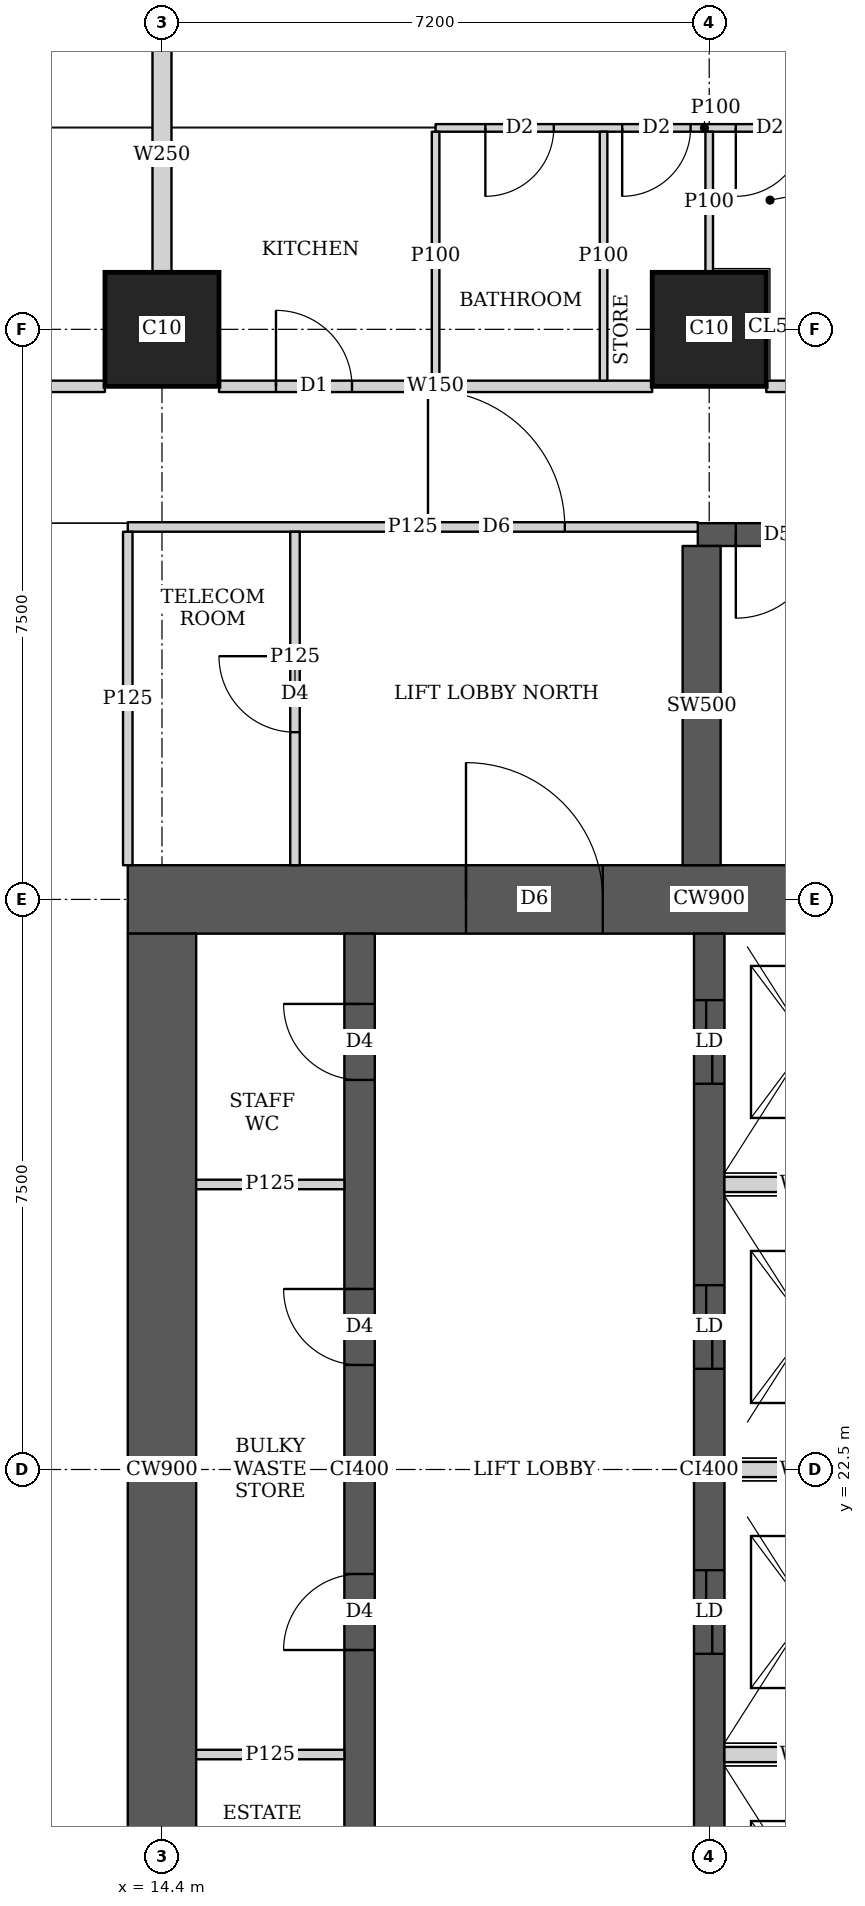
"""IFC4 building model, lengths in metres.
Left out: names, types, materials, properties, quantities, classifications, styles, units other than length and angle.
Written with IfcOpenShell. Run it as: python <this file> out.ifc"""

import sys

from ifc_helpers import new_model, si_unit, direction, frame, frame_2d, origin, origin_2d, place, context, subcontext, project, spatial, rectangle, extrude, element, fill, save


model = new_model("IFC4")
c1 = context("Model", 3, precision=1e-05, world=origin(), true_north=direction((0.0, 1.0)))
c2 = subcontext(c1, "Body", "Model", "MODEL_VIEW")
j1 = project(units=[si_unit("LENGTHUNIT", "METRE"), si_unit("PLANEANGLEUNIT", "RADIAN")], contexts=[c1])
p1 = place(None, origin())
s1 = spatial("IfcSite", under=j1, at=p1, CompositionType="ELEMENT")
p2 = place(p1, origin())
s2 = spatial("IfcBuilding", under=s1, at=p2, CompositionType="ELEMENT")
p3 = place(p2, frame((0.0, 0.0, 147.05)))
s3 = spatial("IfcBuildingStorey", under=s2, at=p3, CompositionType="ELEMENT", Elevation=147.05)
for number, where, z_axis, x_axis in (
    (1, (14.4, 37.5, 0.0), (0.0, 0.0, 1.0), (1.0, 0.0, 0.0)),
    (2, (21.6, 37.5, 0.0), (0.0, 0.0, 1.0), (1.0, 0.0, 0.0)),
):
    element("IfcColumn", number, at=place(p3, frame(where, z_axis=z_axis, x_axis=x_axis)), inside=s3, PredefinedType="COLUMN", context=c2, shape_type="SweptSolid", body=[
        extrude(rectangle(XDim=1.5, YDim=1.5, at=origin_2d()), origin(), (0.0, 0.0, 1.0), 3.75),
    ])
p4 = place(p3, frame((13.95, 30.0, 0.0), z_axis=(0.0, 0.0, 1.0), x_axis=(1.0, 0.0, 0.0)))
e3 = element("IfcWall", 3, at=p4, inside=s3, PredefinedType="SHEAR", context=c2, shape_type="SweptSolid", body=[
    extrude(rectangle(XDim=15.3, YDim=0.9, at=frame_2d((7.65, 0.0))), origin(), (0.0, 0.0, 1.0), 3.75),
])
p5 = place(p4, frame((4.45, 0.0, 0.0)))
e4 = element("IfcOpeningElement", 4, at=p5, cuts=e3, PredefinedType="OPENING", context=c2, shape_type="SweptSolid", body=[
    extrude(rectangle(XDim=1.8, YDim=2.1, at=frame_2d((0.9, 1.05))), frame((0.0, 0.46, 0.0), z_axis=(0.0, -1.0, 0.0), x_axis=(1.0, 0.0, 0.0)), (0.0, 0.0, 1.0), 0.92),
])
p6 = place(p4, frame((10.7, 0.0, 0.0)))
e5 = element("IfcOpeningElement", 5, at=p6, cuts=e3, PredefinedType="OPENING", context=c2, shape_type="SweptSolid", body=[
    extrude(rectangle(XDim=1.1, YDim=2.1, at=frame_2d((0.55, 1.05))), frame((0.0, 0.46, 0.0), z_axis=(0.0, -1.0, 0.0), x_axis=(1.0, 0.0, 0.0)), (0.0, 0.0, 1.0), 0.92),
])
p7 = place(p3, frame((14.4, 15.45, 0.0), z_axis=(0.0, 0.0, 1.0), x_axis=(0.0, 1.0, 0.0)))
e6 = element("IfcWall", 6, at=p7, inside=s3, PredefinedType="SHEAR", context=c2, shape_type="SweptSolid", body=[
    extrude(rectangle(XDim=14.1, YDim=0.9, at=frame_2d((7.05, 0.0))), origin(), (0.0, 0.0, 1.0), 3.75),
])
p8 = place(p3, frame((17.0, 15.45, 0.0), z_axis=(0.0, 0.0, 1.0), x_axis=(0.0, 1.0, 0.0)))
e7 = element("IfcWall", 7, at=p8, inside=s3, PredefinedType="SHEAR", context=c2, shape_type="SweptSolid", body=[
    extrude(rectangle(XDim=14.1, YDim=0.4, at=frame_2d((7.05, 0.0))), origin(), (0.0, 0.0, 1.0), 3.75),
])
p9 = place(p8, frame((0.925, 0.0, 0.0)))
e8 = element("IfcOpeningElement", 8, at=p9, cuts=e7, PredefinedType="OPENING", context=c2, shape_type="SweptSolid", body=[
    extrude(rectangle(XDim=1.0, YDim=2.1, at=frame_2d((0.5, 1.05))), frame((0.0, 0.21, 0.0), z_axis=(0.0, -1.0, 0.0), x_axis=(1.0, 0.0, 0.0)), (0.0, 0.0, 1.0), 0.42),
])
p10 = place(p8, frame((4.675, 0.0, 0.0)))
e9 = element("IfcOpeningElement", 9, at=p10, cuts=e7, PredefinedType="OPENING", context=c2, shape_type="SweptSolid", body=[
    extrude(rectangle(XDim=1.0, YDim=2.1, at=frame_2d((0.5, 1.05))), frame((0.0, 0.21, 0.0), z_axis=(0.0, -1.0, 0.0), x_axis=(1.0, 0.0, 0.0)), (0.0, 0.0, 1.0), 0.42),
])
p11 = place(p8, frame((8.425, 0.0, 0.0)))
e10 = element("IfcOpeningElement", 10, at=p11, cuts=e7, PredefinedType="OPENING", context=c2, shape_type="SweptSolid", body=[
    extrude(rectangle(XDim=1.0, YDim=2.1, at=frame_2d((0.5, 1.05))), frame((0.0, 0.21, 0.0), z_axis=(0.0, -1.0, 0.0), x_axis=(1.0, 0.0, 0.0)), (0.0, 0.0, 1.0), 0.42),
])
p12 = place(p8, frame((12.175, 0.0, 0.0)))
e11 = element("IfcOpeningElement", 11, at=p12, cuts=e7, PredefinedType="OPENING", context=c2, shape_type="SweptSolid", body=[
    extrude(rectangle(XDim=1.0, YDim=2.1, at=frame_2d((0.5, 1.05))), frame((0.0, 0.21, 0.0), z_axis=(0.0, -1.0, 0.0), x_axis=(1.0, 0.0, 0.0)), (0.0, 0.0, 1.0), 0.42),
])
p13 = place(p3, frame((21.6, 15.45, 0.0), z_axis=(0.0, 0.0, 1.0), x_axis=(0.0, 1.0, 0.0)))
e12 = element("IfcWall", 12, at=p13, inside=s3, PredefinedType="SHEAR", context=c2, shape_type="SweptSolid", body=[
    extrude(rectangle(XDim=14.1, YDim=0.4, at=frame_2d((7.05, 0.0))), origin(), (0.0, 0.0, 1.0), 3.75),
])
p14 = place(p13, frame((0.875, 0.0, 0.0)))
e13 = element("IfcOpeningElement", 13, at=p14, cuts=e12, PredefinedType="OPENING", context=c2, shape_type="SweptSolid", body=[
    extrude(rectangle(XDim=1.1, YDim=2.1, at=frame_2d((0.55, 1.05))), frame((0.0, 0.21, 0.0), z_axis=(0.0, -1.0, 0.0), x_axis=(1.0, 0.0, 0.0)), (0.0, 0.0, 1.0), 0.42),
])
p15 = place(p13, frame((4.625, 0.0, 0.0)))
e14 = element("IfcOpeningElement", 14, at=p15, cuts=e12, PredefinedType="OPENING", context=c2, shape_type="SweptSolid", body=[
    extrude(rectangle(XDim=1.1, YDim=2.1, at=frame_2d((0.55, 1.05))), frame((0.0, 0.21, 0.0), z_axis=(0.0, -1.0, 0.0), x_axis=(1.0, 0.0, 0.0)), (0.0, 0.0, 1.0), 0.42),
])
p16 = place(p13, frame((8.375, 0.0, 0.0)))
e15 = element("IfcOpeningElement", 15, at=p16, cuts=e12, PredefinedType="OPENING", context=c2, shape_type="SweptSolid", body=[
    extrude(rectangle(XDim=1.1, YDim=2.1, at=frame_2d((0.55, 1.05))), frame((0.0, 0.21, 0.0), z_axis=(0.0, -1.0, 0.0), x_axis=(1.0, 0.0, 0.0)), (0.0, 0.0, 1.0), 0.42),
])
p17 = place(p13, frame((12.125, 0.0, 0.0)))
e16 = element("IfcOpeningElement", 16, at=p17, cuts=e12, PredefinedType="OPENING", context=c2, shape_type="SweptSolid", body=[
    extrude(rectangle(XDim=1.1, YDim=2.1, at=frame_2d((0.55, 1.05))), frame((0.0, 0.21, 0.0), z_axis=(0.0, -1.0, 0.0), x_axis=(1.0, 0.0, 0.0)), (0.0, 0.0, 1.0), 0.42),
])
p18 = place(p3, frame((21.45, 34.8, 0.0), z_axis=(0.0, 0.0, 1.0), x_axis=(1.0, 0.0, 0.0)))
e17 = element("IfcWall", 17, at=p18, inside=s3, PredefinedType="SHEAR", context=c2, shape_type="SweptSolid", body=[
    extrude(rectangle(XDim=7.5, YDim=0.3, at=frame_2d((3.75, 0.0))), origin(), (0.0, 0.0, 1.0), 3.75),
])
p19 = place(p18, frame((0.5, 0.0, 0.0)))
e18 = element("IfcOpeningElement", 18, at=p19, cuts=e17, PredefinedType="OPENING", context=c2, shape_type="SweptSolid", body=[
    extrude(rectangle(XDim=1.1, YDim=2.1, at=frame_2d((0.55, 1.05))), frame((0.0, 0.16, 0.0), z_axis=(0.0, -1.0, 0.0), x_axis=(1.0, 0.0, 0.0)), (0.0, 0.0, 1.0), 0.32),
])
p20 = place(p3, frame((21.5, 30.45, 0.0), z_axis=(0.0, 0.0, 1.0), x_axis=(0.0, 1.0, 0.0)))
e19 = element("IfcWall", 19, at=p20, inside=s3, PredefinedType="SHEAR", context=c2, shape_type="SweptSolid", body=[
    extrude(rectangle(XDim=4.2, YDim=0.5, at=frame_2d((2.1, 0.0))), origin(), (0.0, 0.0, 1.0), 3.75),
])
p21 = place(p3, frame((8.1, 36.75, 0.0), z_axis=(0.0, 0.0, 1.0), x_axis=(1.0, 0.0, 0.0)))
e20 = element("IfcWall", 20, at=p21, inside=s3, PredefinedType="SOLIDWALL", context=c2, shape_type="SweptSolid", body=[
    extrude(rectangle(XDim=5.549, YDim=0.15, at=frame_2d((2.774, 0.0))), origin(), (0.0, 0.0, 1.0), 3.5),
])
p22 = place(p21, frame((3.739, 0.0, 0.0)))
e21 = element("IfcOpeningElement", 21, at=p22, cuts=e20, PredefinedType="OPENING", context=c2, shape_type="SweptSolid", body=[
    extrude(rectangle(XDim=1.0, YDim=2.1, at=frame_2d((0.5, 1.05))), frame((0.0, 0.085, 0.0), z_axis=(0.0, -1.0, 0.0), x_axis=(1.0, 0.0, 0.0)), (0.0, 0.0, 1.0), 0.17),
])
p23 = place(p3, frame((15.151, 36.75, 0.0), z_axis=(0.0, 0.0, 1.0), x_axis=(1.0, 0.0, 0.0)))
e22 = element("IfcWall", 22, at=p23, inside=s3, PredefinedType="SOLIDWALL", context=c2, shape_type="SweptSolid", body=[
    extrude(rectangle(XDim=5.698, YDim=0.15, at=frame_2d((2.849, 0.0))), origin(), (0.0, 0.0, 1.0), 3.5),
])
p24 = place(p23, frame((0.749, 0.0, 0.0)))
e23 = element("IfcOpeningElement", 23, at=p24, cuts=e22, PredefinedType="OPENING", context=c2, shape_type="SweptSolid", body=[
    extrude(rectangle(XDim=1.0, YDim=2.1, at=frame_2d((0.5, 1.05))), frame((0.0, 0.085, 0.0), z_axis=(0.0, -1.0, 0.0), x_axis=(1.0, 0.0, 0.0)), (0.0, 0.0, 1.0), 0.17),
])
p25 = place(p3, frame((22.351, 36.75, 0.0), z_axis=(0.0, 0.0, 1.0), x_axis=(1.0, 0.0, 0.0)))
e24 = element("IfcWall", 24, at=p25, inside=s3, PredefinedType="SOLIDWALL", context=c2, shape_type="SweptSolid", body=[
    extrude(rectangle(XDim=5.698, YDim=0.15, at=frame_2d((2.849, 0.0))), origin(), (0.0, 0.0, 1.0), 3.5),
])
p26 = place(p25, frame((4.032, 0.0, 0.0)))
e25 = element("IfcOpeningElement", 25, at=p26, cuts=e24, PredefinedType="OPENING", context=c2, shape_type="SweptSolid", body=[
    extrude(rectangle(XDim=1.0, YDim=2.1, at=frame_2d((0.5, 1.05))), frame((0.0, 0.085, 0.0), z_axis=(0.0, -1.0, 0.0), x_axis=(1.0, 0.0, 0.0)), (0.0, 0.0, 1.0), 0.17),
])
p27 = place(p3, frame((18.0, 40.15, 0.0), z_axis=(0.0, 0.0, 1.0), x_axis=(1.0, 0.0, 0.0)))
e26 = element("IfcWall", 26, at=p27, inside=s3, PredefinedType="PARTITIONING", context=c2, shape_type="SweptSolid", body=[
    extrude(rectangle(XDim=7.075, YDim=0.1, at=frame_2d((3.538, 0.0))), origin(), (0.0, 0.0, 1.0), 3.5),
])
p28 = place(p27, frame((0.655, 0.0, 0.0)))
e27 = element("IfcOpeningElement", 27, at=p28, cuts=e26, PredefinedType="OPENING", context=c2, shape_type="SweptSolid", body=[
    extrude(rectangle(XDim=0.9, YDim=2.1, at=frame_2d((0.45, 1.05))), frame((0.0, 0.06, 0.0), z_axis=(0.0, -1.0, 0.0), x_axis=(1.0, 0.0, 0.0)), (0.0, 0.0, 1.0), 0.12),
])
p29 = place(p27, frame((3.95, 0.0, 0.0)))
e28 = element("IfcOpeningElement", 28, at=p29, cuts=e26, PredefinedType="OPENING", context=c2, shape_type="SweptSolid", body=[
    extrude(rectangle(XDim=0.9, YDim=2.1, at=frame_2d((0.45, 1.05))), frame((0.0, 0.06, 0.0), z_axis=(0.0, -1.0, 0.0), x_axis=(1.0, 0.0, 0.0)), (0.0, 0.0, 1.0), 0.12),
])
p30 = place(p27, frame((2.455, 0.0, 0.0)))
e29 = element("IfcOpeningElement", 29, at=p30, cuts=e26, PredefinedType="OPENING", context=c2, shape_type="SweptSolid", body=[
    extrude(rectangle(XDim=0.9, YDim=2.1, at=frame_2d((0.45, 1.05))), frame((0.0, 0.06, 0.0), z_axis=(0.0, -1.0, 0.0), x_axis=(1.0, 0.0, 0.0)), (0.0, 0.0, 1.0), 0.12),
])
p31 = place(p27, frame((5.75, 0.0, 0.0)))
e30 = element("IfcOpeningElement", 30, at=p31, cuts=e26, PredefinedType="OPENING", context=c2, shape_type="SweptSolid", body=[
    extrude(rectangle(XDim=0.9, YDim=2.1, at=frame_2d((0.45, 1.05))), frame((0.0, 0.06, 0.0), z_axis=(0.0, -1.0, 0.0), x_axis=(1.0, 0.0, 0.0)), (0.0, 0.0, 1.0), 0.12),
])
p32 = place(p3, frame((18.0, 36.825, 0.0), z_axis=(0.0, 0.0, 1.0), x_axis=(0.0, 1.0, 0.0)))
e31 = element("IfcWall", 31, at=p32, inside=s3, PredefinedType="PARTITIONING", context=c2, shape_type="SweptSolid", body=[
    extrude(rectangle(XDim=3.275, YDim=0.1, at=frame_2d((1.638, 0.0))), origin(), (0.0, 0.0, 1.0), 3.5),
])
p33 = place(p3, frame((21.6, 38.251, 0.0), z_axis=(0.0, 0.0, 1.0), x_axis=(0.0, 1.0, 0.0)))
e32 = element("IfcWall", 32, at=p33, inside=s3, PredefinedType="PARTITIONING", context=c2, shape_type="SweptSolid", body=[
    extrude(rectangle(XDim=1.849, YDim=0.1, at=frame_2d((0.925, 0.0))), origin(), (0.0, 0.0, 1.0), 3.5),
])
p34 = place(p3, frame((20.21, 36.825, 0.0), z_axis=(0.0, 0.0, 1.0), x_axis=(0.0, 1.0, 0.0)))
e33 = element("IfcWall", 33, at=p34, inside=s3, PredefinedType="PARTITIONING", context=c2, shape_type="SweptSolid", body=[
    extrude(rectangle(XDim=3.275, YDim=0.1, at=frame_2d((1.638, 0.0))), origin(), (0.0, 0.0, 1.0), 3.5),
])
p35 = place(p3, frame((14.4, 38.251, 0.0), z_axis=(0.0, 0.0, 1.0), x_axis=(0.0, 1.0, 0.0)))
e34 = element("IfcWall", 34, at=p35, inside=s3, PredefinedType="SOLIDWALL", context=c2, shape_type="SweptSolid", body=[
    extrude(rectangle(XDim=3.099, YDim=0.25, at=frame_2d((1.55, 0.0))), origin(), (0.0, 0.0, 1.0), 3.5),
])
p36 = place(p3, frame((13.95, 30.45, 0.0), z_axis=(0.0, 0.0, 1.0), x_axis=(0.0, 1.0, 0.0)))
e35 = element("IfcWall", 35, at=p36, inside=s3, PredefinedType="PARTITIONING", context=c2, shape_type="SweptSolid", body=[
    extrude(rectangle(XDim=4.387, YDim=0.125, at=frame_2d((2.193, 0.0))), origin(), (0.0, 0.0, 1.0), 3.5),
])
p37 = place(p3, frame((13.95, 34.9, 0.0), z_axis=(0.0, 0.0, 1.0), x_axis=(1.0, 0.0, 0.0)))
e36 = element("IfcWall", 36, at=p37, inside=s3, PredefinedType="PARTITIONING", context=c2, shape_type="SweptSolid", body=[
    extrude(rectangle(XDim=7.5, YDim=0.125, at=frame_2d((3.75, 0.0))), origin(), (0.0, 0.0, 1.0), 3.5),
])
p38 = place(p37, frame((3.95, 0.0, 0.0)))
e37 = element("IfcOpeningElement", 37, at=p38, cuts=e36, PredefinedType="OPENING", context=c2, shape_type="SweptSolid", body=[
    extrude(rectangle(XDim=1.8, YDim=2.1, at=frame_2d((0.9, 1.05))), frame((0.0, 0.073, 0.0), z_axis=(0.0, -1.0, 0.0), x_axis=(1.0, 0.0, 0.0)), (0.0, 0.0, 1.0), 0.145),
])
p39 = place(p3, frame((16.15, 30.45, 0.0), z_axis=(0.0, 0.0, 1.0), x_axis=(0.0, 1.0, 0.0)))
e38 = element("IfcWall", 38, at=p39, inside=s3, PredefinedType="PARTITIONING", context=c2, shape_type="SweptSolid", body=[
    extrude(rectangle(XDim=4.387, YDim=0.125, at=frame_2d((2.193, 0.0))), origin(), (0.0, 0.0, 1.0), 3.5),
])
p40 = place(p39, frame((1.75, 0.0, 0.0)))
e39 = element("IfcOpeningElement", 39, at=p40, cuts=e38, PredefinedType="OPENING", context=c2, shape_type="SweptSolid", body=[
    extrude(rectangle(XDim=1.0, YDim=2.1, at=frame_2d((0.5, 1.05))), frame((0.0, 0.073, 0.0), z_axis=(0.0, -1.0, 0.0), x_axis=(1.0, 0.0, 0.0)), (0.0, 0.0, 1.0), 0.145),
])
for number, where, z_axis, x_axis in (
    (40, (14.85, 18.75, 0.0), (0.0, 0.0, 1.0), (1.0, 0.0, 0.0)),
    (41, (14.85, 26.25, 0.0), (0.0, 0.0, 1.0), (1.0, 0.0, 0.0)),
):
    element("IfcWall", number, at=place(p3, frame(where, z_axis=z_axis, x_axis=x_axis)), inside=s3, PredefinedType="PARTITIONING", context=c2, shape_type="SweptSolid", body=[
        extrude(rectangle(XDim=1.95, YDim=0.125, at=frame_2d((0.975, 0.0))), origin(), (0.0, 0.0, 1.0), 3.5),
    ])
for number, where, z_axis, x_axis in (
    (42, (21.8, 18.75, 0.0), (0.0, 0.0, 1.0), (1.0, 0.0, 0.0)),
    (43, (21.8, 22.5, 0.0), (0.0, 0.0, 1.0), (1.0, 0.0, 0.0)),
    (44, (21.8, 26.25, 0.0), (0.0, 0.0, 1.0), (1.0, 0.0, 0.0)),
):
    element("IfcWall", number, at=place(p3, frame(where, z_axis=z_axis, x_axis=x_axis)), inside=s3, PredefinedType="SOLIDWALL", context=c2, shape_type="SweptSolid", body=[
        extrude(rectangle(XDim=2.2, YDim=0.2, at=frame_2d((1.1, 0.0))), origin(), (0.0, 0.0, 1.0), 3.5),
    ])
p41 = place(p28, origin())
e45 = element("IfcDoor", 45, at=p41, inside=s3, OperationType="SINGLE_SWING_RIGHT", PredefinedType="DOOR", context=c2, shape_type="SweptSolid", body=[
    extrude(rectangle(XDim=0.9, YDim=2.1, at=frame_2d((0.45, 1.05))), frame((0.0, 0.025, 0.0), z_axis=(0.0, -1.0, 0.0), x_axis=(1.0, 0.0, 0.0)), (0.0, 0.0, 1.0), 0.05),
])
fill(e27, e45)
p42 = place(p29, origin())
e46 = element("IfcDoor", 46, at=p42, inside=s3, OperationType="SINGLE_SWING_RIGHT", PredefinedType="DOOR", context=c2, shape_type="SweptSolid", body=[
    extrude(rectangle(XDim=0.9, YDim=2.1, at=frame_2d((0.45, 1.05))), frame((0.0, 0.025, 0.0), z_axis=(0.0, -1.0, 0.0), x_axis=(1.0, 0.0, 0.0)), (0.0, 0.0, 1.0), 0.05),
])
fill(e28, e46)
p43 = place(p30, origin())
e47 = element("IfcDoor", 47, at=p43, inside=s3, OperationType="SINGLE_SWING_RIGHT", PredefinedType="DOOR", context=c2, shape_type="SweptSolid", body=[
    extrude(rectangle(XDim=0.9, YDim=2.1, at=frame_2d((0.45, 1.05))), frame((0.0, 0.025, 0.0), z_axis=(0.0, -1.0, 0.0), x_axis=(1.0, 0.0, 0.0)), (0.0, 0.0, 1.0), 0.05),
])
fill(e29, e47)
p44 = place(p24, origin())
e48 = element("IfcDoor", 48, at=p44, inside=s3, OperationType="SINGLE_SWING_LEFT", PredefinedType="DOOR", context=c2, shape_type="SweptSolid", body=[
    extrude(rectangle(XDim=1.0, YDim=2.1, at=frame_2d((0.5, 1.05))), frame((0.0, 0.025, 0.0), z_axis=(0.0, -1.0, 0.0), x_axis=(1.0, 0.0, 0.0)), (0.0, 0.0, 1.0), 0.05),
])
fill(e23, e48)
p45 = place(p40, origin())
e49 = element("IfcDoor", 49, at=p45, inside=s3, OperationType="SINGLE_SWING_RIGHT", PredefinedType="DOOR", context=c2, shape_type="SweptSolid", body=[
    extrude(rectangle(XDim=1.0, YDim=2.1, at=frame_2d((0.5, 1.05))), frame((0.0, 0.025, 0.0), z_axis=(0.0, -1.0, 0.0), x_axis=(1.0, 0.0, 0.0)), (0.0, 0.0, 1.0), 0.05),
])
fill(e39, e49)
p46 = place(p38, origin())
e50 = element("IfcDoor", 50, at=p46, inside=s3, OperationType="DOUBLE_DOOR_SINGLE_SWING", PredefinedType="DOOR", context=c2, shape_type="SweptSolid", body=[
    extrude(rectangle(XDim=1.8, YDim=2.1, at=frame_2d((0.9, 1.05))), frame((0.0, 0.025, 0.0), z_axis=(0.0, -1.0, 0.0), x_axis=(1.0, 0.0, 0.0)), (0.0, 0.0, 1.0), 0.05),
])
fill(e37, e50)
p47 = place(p10, origin())
e51 = element("IfcDoor", 51, at=p47, inside=s3, OperationType="SINGLE_SWING_LEFT", PredefinedType="DOOR", context=c2, shape_type="SweptSolid", body=[
    extrude(rectangle(XDim=1.0, YDim=2.1, at=frame_2d((0.5, 1.05))), frame((0.0, 0.025, 0.0), z_axis=(0.0, -1.0, 0.0), x_axis=(1.0, 0.0, 0.0)), (0.0, 0.0, 1.0), 0.05),
])
fill(e9, e51)
p48 = place(p11, origin())
e52 = element("IfcDoor", 52, at=p48, inside=s3, OperationType="SINGLE_SWING_RIGHT", PredefinedType="DOOR", context=c2, shape_type="SweptSolid", body=[
    extrude(rectangle(XDim=1.0, YDim=2.1, at=frame_2d((0.5, 1.05))), frame((0.0, 0.025, 0.0), z_axis=(0.0, -1.0, 0.0), x_axis=(1.0, 0.0, 0.0)), (0.0, 0.0, 1.0), 0.05),
])
fill(e10, e52)
p49 = place(p12, origin())
e53 = element("IfcDoor", 53, at=p49, inside=s3, OperationType="SINGLE_SWING_RIGHT", PredefinedType="DOOR", context=c2, shape_type="SweptSolid", body=[
    extrude(rectangle(XDim=1.0, YDim=2.1, at=frame_2d((0.5, 1.05))), frame((0.0, 0.025, 0.0), z_axis=(0.0, -1.0, 0.0), x_axis=(1.0, 0.0, 0.0)), (0.0, 0.0, 1.0), 0.05),
])
fill(e11, e53)
p50 = place(p5, origin())
e54 = element("IfcDoor", 54, at=p50, inside=s3, OperationType="DOUBLE_DOOR_SINGLE_SWING", PredefinedType="DOOR", context=c2, shape_type="SweptSolid", body=[
    extrude(rectangle(XDim=1.8, YDim=2.1, at=frame_2d((0.9, 1.05))), frame((0.0, 0.025, 0.0), z_axis=(0.0, -1.0, 0.0), x_axis=(1.0, 0.0, 0.0)), (0.0, 0.0, 1.0), 0.05),
])
fill(e4, e54)
p51 = place(p15, origin())
e55 = element("IfcDoor", 55, at=p51, inside=s3, OperationType="DOUBLE_DOOR_SLIDING", PredefinedType="DOOR", context=c2, shape_type="SweptSolid", body=[
    extrude(rectangle(XDim=1.1, YDim=2.1, at=frame_2d((0.55, 1.05))), frame((0.0, 0.025, 0.0), z_axis=(0.0, -1.0, 0.0), x_axis=(1.0, 0.0, 0.0)), (0.0, 0.0, 1.0), 0.05),
])
fill(e14, e55)
p52 = place(p16, origin())
e56 = element("IfcDoor", 56, at=p52, inside=s3, OperationType="DOUBLE_DOOR_SLIDING", PredefinedType="DOOR", context=c2, shape_type="SweptSolid", body=[
    extrude(rectangle(XDim=1.1, YDim=2.1, at=frame_2d((0.55, 1.05))), frame((0.0, 0.025, 0.0), z_axis=(0.0, -1.0, 0.0), x_axis=(1.0, 0.0, 0.0)), (0.0, 0.0, 1.0), 0.05),
])
fill(e15, e56)
p53 = place(p17, origin())
e57 = element("IfcDoor", 57, at=p53, inside=s3, OperationType="DOUBLE_DOOR_SLIDING", PredefinedType="DOOR", context=c2, shape_type="SweptSolid", body=[
    extrude(rectangle(XDim=1.1, YDim=2.1, at=frame_2d((0.55, 1.05))), frame((0.0, 0.025, 0.0), z_axis=(0.0, -1.0, 0.0), x_axis=(1.0, 0.0, 0.0)), (0.0, 0.0, 1.0), 0.05),
])
fill(e16, e57)
p54 = place(p19, origin())
e58 = element("IfcDoor", 58, at=p54, inside=s3, OperationType="SINGLE_SWING_RIGHT", PredefinedType="DOOR", context=c2, shape_type="SweptSolid", body=[
    extrude(rectangle(XDim=1.1, YDim=2.1, at=frame_2d((0.55, 1.05))), frame((0.0, 0.025, 0.0), z_axis=(0.0, -1.0, 0.0), x_axis=(1.0, 0.0, 0.0)), (0.0, 0.0, 1.0), 0.05),
])
fill(e18, e58)
save(model, sys.argv[1])
